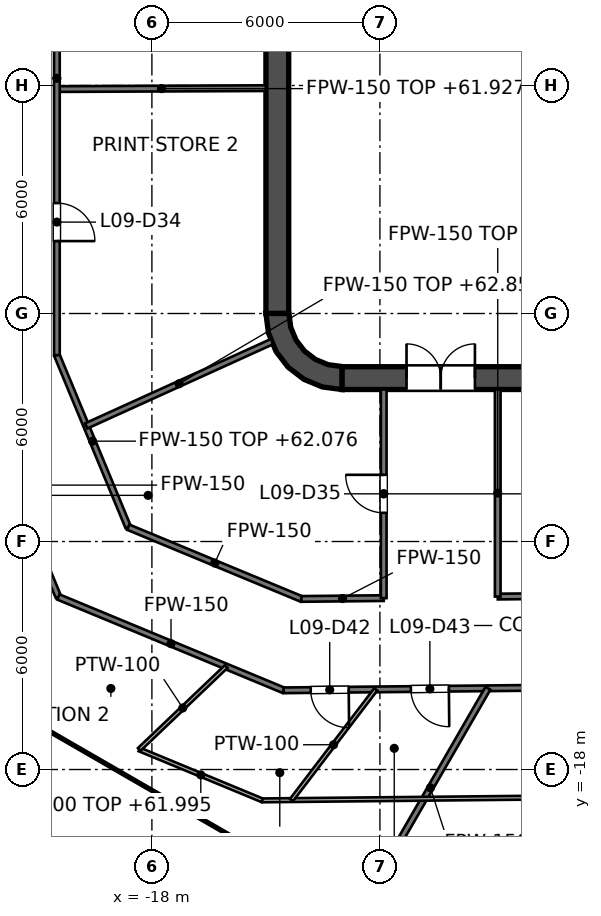
"""IFC4 building model, lengths in metres.
Left out: names, types, materials, properties, quantities, classifications, styles, units other than length and angle.
Written with IfcOpenShell. Run it as: python <this file> out.ifc"""

import sys

from ifc_helpers import new_model, si_unit, direction, frame, frame_2d, origin, place, context, subcontext, project, spatial, polyline, rectangle, outline, extrude, element, fill, save


model = new_model("IFC4")
c1 = context("Model", 3, precision=1e-05, world=origin(), true_north=direction((0.0, 1.0)))
c2 = subcontext(c1, "Body", "Model", "MODEL_VIEW")
j1 = project(units=[si_unit("LENGTHUNIT", "METRE"), si_unit("PLANEANGLEUNIT", "RADIAN")], contexts=[c1])
p1 = place(None, origin())
s1 = spatial("IfcSite", under=j1, at=p1, CompositionType="ELEMENT")
p2 = place(p1, origin())
s2 = spatial("IfcBuilding", under=s1, at=p2, CompositionType="ELEMENT")
p3 = place(p2, frame((0.0, 0.0, 58.8)))
s3 = spatial("IfcBuildingStorey", under=s2, at=p3, CompositionType="ELEMENT", Elevation=58.8)
p4 = place(p3, frame((-13.0, -7.7, 0.0), z_axis=(0.0, 0.0, 1.0), x_axis=(1.0, 0.0, 0.0)))
e1 = element("IfcWall", 1, at=p4, inside=s3, PredefinedType="SHEAR", context=c2, shape_type="SweptSolid", body=[
    extrude(rectangle(XDim=26.0, YDim=0.6, at=frame_2d((13.0, 0.0))), origin(), (0.0, 0.0, 1.0), 4.2),
])
p5 = place(p4, frame((1.7, 0.0, 0.0)))
e2 = element("IfcOpeningElement", 2, at=p5, cuts=e1, PredefinedType="OPENING", context=c2, shape_type="SweptSolid", body=[
    extrude(rectangle(XDim=1.8, YDim=2.1, at=frame_2d((0.9, 1.05))), frame((0.0, 0.3, 0.0), z_axis=(0.0, -1.0, 0.0), x_axis=(1.0, 0.0, 0.0)), (0.0, 0.0, 1.0), 0.6),
])
p6 = place(p4, frame((22.5, 0.0, 0.0)))
e3 = element("IfcOpeningElement", 3, at=p6, cuts=e1, PredefinedType="OPENING", context=c2, shape_type="SweptSolid", body=[
    extrude(rectangle(XDim=1.8, YDim=2.1, at=frame_2d((0.9, 1.05))), frame((0.0, 0.3, 0.0), z_axis=(0.0, -1.0, 0.0), x_axis=(1.0, 0.0, 0.0)), (0.0, 0.0, 1.0), 0.6),
])
p7 = place(p3, frame((-14.7, -6.0, 0.0), z_axis=(0.0, 0.0, 1.0), x_axis=(0.0, 1.0, 0.0)))
e4 = element("IfcWall", 4, at=p7, inside=s3, PredefinedType="SHEAR", context=c2, shape_type="SweptSolid", body=[
    extrude(rectangle(XDim=12.0, YDim=0.6, at=frame_2d((6.0, 0.0))), origin(), (0.0, 0.0, 1.0), 4.2),
])
p8 = place(p3, origin())
e5 = element("IfcWall", 5, at=p8, inside=s3, PredefinedType="SHEAR", context=c2, shape_type="SweptSolid", body=[
    extrude(outline(polyline([(-13.0, -8.0), (-13.0, -7.395), (-13.361, -7.347), (-13.698, -7.208), (-13.986, -6.986), (-14.208, -6.698), (-14.347, -6.361), (-14.395, -6.0), (-15.0, -6.0), (-14.932, -6.518), (-14.732, -7.0), (-14.414, -7.414), (-14.0, -7.732), (-13.518, -7.932), (-13.0, -8.0)])), origin(), (0.0, 0.0, 1.0), 4.2),
])
p9 = place(p3, frame((-9.0, -6.6, 0.0), z_axis=(0.0, 0.0, 1.0), x_axis=(0.0, 1.0, 0.0)))
e6 = element("IfcWall", 6, at=p9, inside=s3, PredefinedType="PARTITIONING", context=c2, shape_type="SweptSolid", body=[
    extrude(rectangle(XDim=2.5, YDim=0.25, at=frame_2d((1.25, 0.0))), origin(), (0.0, 0.0, 1.0), 4.05),
])
p10 = place(p9, frame((0.75, 0.0, 0.0)))
e7 = element("IfcOpeningElement", 7, at=p10, cuts=e6, PredefinedType="OPENING", context=c2, shape_type="SweptSolid", body=[
    extrude(rectangle(XDim=1.0, YDim=2.1, at=frame_2d((0.5, 1.05))), frame((0.0, 0.125, 0.0), z_axis=(0.0, -1.0, 0.0), x_axis=(1.0, 0.0, 0.0)), (0.0, 0.0, 1.0), 0.25),
])
p11 = place(p3, frame((-9.125, -7.0, 0.0), z_axis=(0.0, 0.0, 1.0), x_axis=(1.0, 0.0, 0.0)))
e8 = element("IfcWall", 8, at=p11, inside=s3, PredefinedType="SOLIDWALL", context=c2, shape_type="SweptSolid", body=[
    extrude(rectangle(XDim=18.25, YDim=0.8, at=frame_2d((9.125, 0.0))), origin(), (0.0, 0.0, 1.0), 4.05),
])
p12 = place(p3, frame((-9.125, -1.525, 0.0), z_axis=(0.0, 0.0, 1.0), x_axis=(1.0, 0.0, 0.0)))
e9 = element("IfcWall", 9, at=p12, inside=s3, PredefinedType="SOLIDWALL", context=c2, shape_type="SweptSolid", body=[
    extrude(rectangle(XDim=18.25, YDim=0.25, at=frame_2d((9.125, 0.0))), origin(), (0.0, 0.0, 1.0), 4.05),
])
p13 = place(p12, frame((7.15, 0.0, 0.0)))
e10 = element("IfcOpeningElement", 10, at=p13, cuts=e9, PredefinedType="OPENING", context=c2, shape_type="SweptSolid", body=[
    extrude(rectangle(XDim=1.2, YDim=2.1, at=frame_2d((0.6, 1.05))), frame((0.0, 0.125, 0.0), z_axis=(0.0, -1.0, 0.0), x_axis=(1.0, 0.0, 0.0)), (0.0, 0.0, 1.0), 0.25),
])
p14 = place(p12, frame((10.2, 0.0, 0.0)))
e11 = element("IfcOpeningElement", 11, at=p14, cuts=e9, PredefinedType="OPENING", context=c2, shape_type="SweptSolid", body=[
    extrude(rectangle(XDim=1.2, YDim=2.1, at=frame_2d((0.6, 1.05))), frame((0.0, 0.125, 0.0), z_axis=(0.0, -1.0, 0.0), x_axis=(1.0, 0.0, 0.0)), (0.0, 0.0, 1.0), 0.25),
])
p15 = place(p12, frame((16.075, 0.0, 0.0)))
e12 = element("IfcOpeningElement", 12, at=p15, cuts=e9, PredefinedType="OPENING", context=c2, shape_type="SweptSolid", body=[
    extrude(rectangle(XDim=1.0, YDim=2.1, at=frame_2d((0.5, 1.05))), frame((0.0, 0.125, 0.0), z_axis=(0.0, -1.0, 0.0), x_axis=(1.0, 0.0, 0.0)), (0.0, 0.0, 1.0), 0.25),
])
p16 = place(p3, frame((-9.125, -3.975, 0.0), z_axis=(0.0, 0.0, 1.0), x_axis=(1.0, 0.0, 0.0)))
e13 = element("IfcWall", 13, at=p16, inside=s3, PredefinedType="SOLIDWALL", context=c2, shape_type="SweptSolid", body=[
    extrude(rectangle(XDim=12.4, YDim=0.25, at=frame_2d((6.2, 0.0))), origin(), (0.0, 0.0, 1.0), 4.05),
])
p17 = place(p16, frame((1.05, 0.0, 0.0)))
e14 = element("IfcOpeningElement", 14, at=p17, cuts=e13, PredefinedType="OPENING", context=c2, shape_type="SweptSolid", body=[
    extrude(rectangle(XDim=1.2, YDim=2.1, at=frame_2d((0.6, 1.05))), frame((0.0, 0.125, 0.0), z_axis=(0.0, -1.0, 0.0), x_axis=(1.0, 0.0, 0.0)), (0.0, 0.0, 1.0), 0.25),
])
p18 = place(p16, frame((4.1, 0.0, 0.0)))
e15 = element("IfcOpeningElement", 15, at=p18, cuts=e13, PredefinedType="OPENING", context=c2, shape_type="SweptSolid", body=[
    extrude(rectangle(XDim=1.2, YDim=2.1, at=frame_2d((0.6, 1.05))), frame((0.0, 0.125, 0.0), z_axis=(0.0, -1.0, 0.0), x_axis=(1.0, 0.0, 0.0)), (0.0, 0.0, 1.0), 0.25),
])
p19 = place(p3, frame((-9.0, -3.85, 0.0), z_axis=(0.0, 0.0, 1.0), x_axis=(0.0, 1.0, 0.0)))
e16 = element("IfcWall", 16, at=p19, inside=s3, PredefinedType="SOLIDWALL", context=c2, shape_type="SweptSolid", body=[
    extrude(rectangle(XDim=2.2, YDim=0.25, at=frame_2d((1.1, 0.0))), origin(), (0.0, 0.0, 1.0), 4.05),
])
p20 = place(p3, frame((-11.8, -7.4, 0.0), z_axis=(0.0, 0.0, 1.0), x_axis=(0.0, 1.0, 0.0)))
e17 = element("IfcWall", 17, at=p20, inside=s3, PredefinedType="SOLIDWALL", context=c2, shape_type="SweptSolid", body=[
    extrude(rectangle(XDim=14.8, YDim=0.4, at=frame_2d((7.4, 0.0))), origin(), (0.0, 0.0, 1.0), 4.05),
])
p21 = place(p20, frame((11.2, 0.0, 0.0)))
e18 = element("IfcOpeningElement", 18, at=p21, cuts=e17, PredefinedType="OPENING", context=c2, shape_type="SweptSolid", body=[
    extrude(rectangle(XDim=1.1, YDim=2.1, at=frame_2d((0.55, 1.05))), frame((0.0, 0.2, 0.0), z_axis=(0.0, -1.0, 0.0), x_axis=(1.0, 0.0, 0.0)), (0.0, 0.0, 1.0), 0.4),
])
p22 = place(p20, frame((8.3, 0.0, 0.0)))
e19 = element("IfcOpeningElement", 19, at=p22, cuts=e17, PredefinedType="OPENING", context=c2, shape_type="SweptSolid", body=[
    extrude(rectangle(XDim=1.1, YDim=2.1, at=frame_2d((0.55, 1.05))), frame((0.0, 0.2, 0.0), z_axis=(0.0, -1.0, 0.0), x_axis=(1.0, 0.0, 0.0)), (0.0, 0.0, 1.0), 0.4),
])
p23 = place(p20, frame((5.4, 0.0, 0.0)))
e20 = element("IfcOpeningElement", 20, at=p23, cuts=e17, PredefinedType="OPENING", context=c2, shape_type="SweptSolid", body=[
    extrude(rectangle(XDim=1.1, YDim=2.1, at=frame_2d((0.55, 1.05))), frame((0.0, 0.2, 0.0), z_axis=(0.0, -1.0, 0.0), x_axis=(1.0, 0.0, 0.0)), (0.0, 0.0, 1.0), 0.4),
])
p24 = place(p20, frame((13.552, 0.0, 0.0)))
e21 = element("IfcOpeningElement", 21, at=p24, cuts=e17, PredefinedType="OPENING", context=c2, shape_type="SweptSolid", body=[
    extrude(rectangle(XDim=0.9, YDim=2.1, at=frame_2d((0.45, 1.05))), frame((0.0, 0.2, 0.0), z_axis=(0.0, -1.0, 0.0), x_axis=(1.0, 0.0, 0.0)), (0.0, 0.0, 1.0), 0.4),
])
p25 = place(p20, frame((0.347, 0.0, 0.0)))
e22 = element("IfcOpeningElement", 22, at=p25, cuts=e17, PredefinedType="OPENING", context=c2, shape_type="SweptSolid", body=[
    extrude(rectangle(XDim=0.9, YDim=2.1, at=frame_2d((0.45, 1.05))), frame((0.0, 0.2, 0.0), z_axis=(0.0, -1.0, 0.0), x_axis=(1.0, 0.0, 0.0)), (0.0, 0.0, 1.0), 0.4),
])
e23 = element("IfcWall", 23, at=p8, inside=s3, PredefinedType="SOLIDWALL", context=c2, shape_type="SweptSolid", body=[
    extrude(outline(polyline([(-12.0, -5.925), (-12.0, -5.675), (-14.15, -5.675), (-14.15, -3.025), (-12.0, -3.025), (-12.0, -2.775), (-14.15, -2.775), (-14.15, -0.125), (-12.0, -0.125), (-12.0, 0.125), (-14.15, 0.125), (-14.15, 2.775), (-12.0, 2.775), (-12.0, 3.025), (-14.15, 3.025), (-14.15, 5.675), (-12.0, 5.675), (-12.0, 5.925), (-14.15, 5.925), (-14.4, 5.925), (-14.4, 5.675), (-14.4, 3.025), (-14.4, 2.775), (-14.4, 0.125), (-14.4, -0.125), (-14.4, -2.775), (-14.4, -3.025), (-14.4, -5.675), (-14.4, -5.925), (-14.15, -5.925), (-12.0, -5.925)])), origin(), (0.0, 0.0, 1.0), 4.05),
])
p26 = place(p3, frame((-22.9, -7.572, 0.0), z_axis=(0.0, 0.0, 1.0), x_axis=(0.382860357704, -0.923806227788, 0.0)))
e24 = element("IfcWall", 24, at=p26, inside=s3, PredefinedType="PARTITIONING", context=c2, shape_type="SweptSolid", body=[
    extrude(rectangle(XDim=6.374, YDim=0.15, at=frame_2d((3.187, 0.0))), origin(), (0.0, 0.0, 1.0), 3.195),
])
p27 = place(p3, frame((-20.5, -7.095, 0.0), z_axis=(0.0, 0.0, 1.0), x_axis=(0.382878184095, -0.923798839653, 0.0)))
e25 = element("IfcWall", 25, at=p27, inside=s3, PredefinedType="PARTITIONING", context=c2, shape_type="SweptSolid", body=[
    extrude(rectangle(XDim=4.902, YDim=0.15, at=frame_2d((2.451, 0.0))), origin(), (0.0, 0.0, 1.0), 3.276),
])
p28 = place(p3, frame((-20.46, -13.46, 0.0), z_axis=(0.0, 0.0, 1.0), x_axis=(0.9237825057, -0.382917591869, 0.0)))
e26 = element("IfcWall", 26, at=p28, inside=s3, PredefinedType="PARTITIONING", context=c2, shape_type="SweptSolid", body=[
    extrude(rectangle(XDim=6.415, YDim=0.15, at=frame_2d((3.208, 0.0))), origin(), (0.0, 0.0, 1.0), 3.195),
])
p29 = place(p3, frame((-18.623, -11.623, 0.0), z_axis=(0.0, 0.0, 1.0), x_axis=(0.923791670587, -0.38289548098, 0.0)))
e27 = element("IfcWall", 27, at=p29, inside=s3, PredefinedType="PARTITIONING", context=c2, shape_type="SweptSolid", body=[
    extrude(rectangle(XDim=4.931, YDim=0.15, at=frame_2d((2.465, 0.0))), origin(), (0.0, 0.0, 1.0), 3.195),
])
p30 = place(p3, frame((-20.5, -0.094, 0.0), z_axis=(0.0, 0.0, 1.0), x_axis=(0.999990148138, 0.004438876723, 0.0)))
e28 = element("IfcWall", 28, at=p30, inside=s3, PredefinedType="PARTITIONING", context=c2, shape_type="SweptSolid", body=[
    extrude(rectangle(XDim=5.5, YDim=0.15, at=frame_2d((2.75, 0.0))), origin(), (0.0, 0.0, 1.0), 3.127),
])
p31 = place(p3, frame((-14.534, -15.916, 0.0), z_axis=(0.0, 0.0, 1.0), x_axis=(0.999950637767, 0.009935896005, 0.0)))
e29 = element("IfcWall", 29, at=p31, inside=s3, PredefinedType="PARTITIONING", context=c2, shape_type="SweptSolid", body=[
    extrude(rectangle(XDim=33.123, YDim=0.15, at=frame_2d((16.561, 0.0))), origin(), (0.0, 0.0, 1.0), 3.127),
])
p32 = place(p31, frame((0.713, 0.0, 0.0)))
e30 = element("IfcOpeningElement", 30, at=p32, cuts=e29, PredefinedType="OPENING", context=c2, shape_type="SweptSolid", body=[
    extrude(rectangle(XDim=1.0, YDim=2.1, at=frame_2d((0.5, 1.05))), frame((0.0, 0.075, 0.0), z_axis=(0.0, -1.0, 0.0), x_axis=(1.0, 0.0, 0.0)), (0.0, 0.0, 1.0), 0.15),
])
p33 = place(p31, frame((3.349, 0.0, 0.0)))
e31 = element("IfcOpeningElement", 31, at=p33, cuts=e29, PredefinedType="OPENING", context=c2, shape_type="SweptSolid", body=[
    extrude(rectangle(XDim=1.0, YDim=2.1, at=frame_2d((0.5, 1.05))), frame((0.0, 0.075, 0.0), z_axis=(0.0, -1.0, 0.0), x_axis=(1.0, 0.0, 0.0)), (0.0, 0.0, 1.0), 0.15),
])
p34 = place(p31, frame((16.111, 0.0, 0.0)))
e32 = element("IfcOpeningElement", 32, at=p34, cuts=e29, PredefinedType="OPENING", context=c2, shape_type="SweptSolid", body=[
    extrude(rectangle(XDim=1.0, YDim=2.1, at=frame_2d((0.5, 1.05))), frame((0.0, 0.075, 0.0), z_axis=(0.0, -1.0, 0.0), x_axis=(1.0, 0.0, 0.0)), (0.0, 0.0, 1.0), 0.15),
])
p35 = place(p31, frame((25.386, 0.0, 0.0)))
e33 = element("IfcOpeningElement", 33, at=p35, cuts=e29, PredefinedType="OPENING", context=c2, shape_type="SweptSolid", body=[
    extrude(rectangle(XDim=1.0, YDim=2.1, at=frame_2d((0.5, 1.05))), frame((0.0, 0.075, 0.0), z_axis=(0.0, -1.0, 0.0), x_axis=(1.0, 0.0, 0.0)), (0.0, 0.0, 1.0), 0.15),
])
p36 = place(p3, frame((-14.068, -13.511, 0.0), z_axis=(0.0, 0.0, 1.0), x_axis=(0.999950911515, 0.009908307647, 0.0)))
e34 = element("IfcWall", 34, at=p36, inside=s3, PredefinedType="PARTITIONING", context=c2, shape_type="SweptSolid", body=[
    extrude(rectangle(XDim=2.168, YDim=0.15, at=frame_2d((1.084, 0.0))), origin(), (0.0, 0.0, 1.0), 3.195),
])
p37 = place(p3, frame((-8.9, -13.449, 0.0), z_axis=(0.0, 0.0, 1.0), x_axis=(0.999950697987, 0.009929833562, 0.0)))
e35 = element("IfcWall", 35, at=p37, inside=s3, PredefinedType="PARTITIONING", context=c2, shape_type="SweptSolid", body=[
    extrude(rectangle(XDim=17.801, YDim=0.15, at=frame_2d((8.9, 0.0))), origin(), (0.0, 0.0, 1.0), 3.127),
])
p38 = place(p37, frame((3.818, 0.0, 0.0)))
e36 = element("IfcOpeningElement", 36, at=p38, cuts=e35, PredefinedType="OPENING", context=c2, shape_type="SweptSolid", body=[
    extrude(rectangle(XDim=1.0, YDim=2.1, at=frame_2d((0.5, 1.05))), frame((0.0, 0.075, 0.0), z_axis=(0.0, -1.0, 0.0), x_axis=(1.0, 0.0, 0.0)), (0.0, 0.0, 1.0), 0.15),
])
p39 = place(p37, frame((8.391, 0.0, 0.0)))
e37 = element("IfcOpeningElement", 37, at=p39, cuts=e35, PredefinedType="OPENING", context=c2, shape_type="SweptSolid", body=[
    extrude(rectangle(XDim=1.0, YDim=2.1, at=frame_2d((0.5, 1.05))), frame((0.0, 0.075, 0.0), z_axis=(0.0, -1.0, 0.0), x_axis=(1.0, 0.0, 0.0)), (0.0, 0.0, 1.0), 0.15),
])
p40 = place(p37, frame((12.975, 0.0, 0.0)))
e38 = element("IfcOpeningElement", 38, at=p40, cuts=e35, PredefinedType="OPENING", context=c2, shape_type="SweptSolid", body=[
    extrude(rectangle(XDim=1.0, YDim=2.1, at=frame_2d((0.5, 1.05))), frame((0.0, 0.075, 0.0), z_axis=(0.0, -1.0, 0.0), x_axis=(1.0, 0.0, 0.0)), (0.0, 0.0, 1.0), 0.15),
])
p41 = place(p3, frame((-19.728, -8.958, 0.0), z_axis=(0.0, 0.0, 1.0), x_axis=(0.910629511797, 0.413223779863, 0.0)))
e39 = element("IfcWall", 39, at=p41, inside=s3, PredefinedType="PARTITIONING", context=c2, shape_type="SweptSolid", body=[
    extrude(rectangle(XDim=5.368, YDim=0.15, at=frame_2d((2.684, 0.0))), origin(), (0.0, 0.0, 1.0), 4.05),
])
p42 = place(p3, frame((-12.184, -21.103, 0.0), z_axis=(0.0, 0.0, 1.0), x_axis=(0.500022810783, 0.866012233572, 0.0)))
e40 = element("IfcWall", 40, at=p42, inside=s3, PredefinedType="PARTITIONING", context=c2, shape_type="SweptSolid", body=[
    extrude(rectangle(XDim=6.051, YDim=0.15, at=frame_2d((3.025, 0.0))), origin(), (0.0, 0.0, 1.0), 3.502),
])
p43 = place(p3, frame((-8.9, -13.449, 0.0), z_axis=(0.0, 0.0, 1.0), x_axis=(0.0, 1.0, 0.0)))
e41 = element("IfcWall", 41, at=p43, inside=s3, PredefinedType="PARTITIONING", context=c2, shape_type="SweptSolid", body=[
    extrude(rectangle(XDim=5.449, YDim=0.15, at=frame_2d((2.725, 0.0))), origin(), (0.0, 0.0, 1.0), 3.127),
])
p44 = place(p3, frame((-11.9, -13.49, 0.0), z_axis=(0.0, 0.0, 1.0), x_axis=(0.0, 1.0, 0.0)))
e42 = element("IfcWall", 42, at=p44, inside=s3, PredefinedType="PARTITIONING", context=c2, shape_type="SweptSolid", body=[
    extrude(rectangle(XDim=5.49, YDim=0.15, at=frame_2d((2.745, 0.0))), origin(), (0.0, 0.0, 1.0), 3.195),
])
p45 = place(p44, frame((2.245, 0.0, 0.0)))
e43 = element("IfcOpeningElement", 43, at=p45, cuts=e42, PredefinedType="OPENING", context=c2, shape_type="SweptSolid", body=[
    extrude(rectangle(XDim=1.0, YDim=2.1, at=frame_2d((0.5, 1.05))), frame((0.0, 0.075, 0.0), z_axis=(0.0, -1.0, 0.0), x_axis=(1.0, 0.0, 0.0)), (0.0, 0.0, 1.0), 0.15),
])
p46 = place(p3, frame((-20.5, -7.095, 0.0), z_axis=(0.0, 0.0, 1.0), x_axis=(0.0, 1.0, 0.0)))
e44 = element("IfcWall", 44, at=p46, inside=s3, PredefinedType="PARTITIONING", context=c2, shape_type="SweptSolid", body=[
    extrude(rectangle(XDim=14.569, YDim=0.15, at=frame_2d((7.285, 0.0))), origin(), (0.0, 0.0, 1.0), 3.127),
])
p47 = place(p46, frame((10.234, 0.0, 0.0)))
e45 = element("IfcOpeningElement", 45, at=p47, cuts=e44, PredefinedType="OPENING", context=c2, shape_type="SweptSolid", body=[
    extrude(rectangle(XDim=1.0, YDim=2.1, at=frame_2d((0.5, 1.05))), frame((0.0, 0.075, 0.0), z_axis=(0.0, -1.0, 0.0), x_axis=(1.0, 0.0, 0.0)), (0.0, 0.0, 1.0), 0.15),
])
p48 = place(p46, frame((3.0, 0.0, 0.0)))
e46 = element("IfcOpeningElement", 46, at=p48, cuts=e44, PredefinedType="OPENING", context=c2, shape_type="SweptSolid", body=[
    extrude(rectangle(XDim=1.0, YDim=2.1, at=frame_2d((0.5, 1.05))), frame((0.0, 0.075, 0.0), z_axis=(0.0, -1.0, 0.0), x_axis=(1.0, 0.0, 0.0)), (0.0, 0.0, 1.0), 0.15),
])
p49 = place(p3, frame((-18.332, -17.471, 0.0), z_axis=(0.0, 0.0, 1.0), x_axis=(0.923856315575, -0.3827394782, 0.0)))
e47 = element("IfcWall", 47, at=p49, inside=s3, PredefinedType="PARTITIONING", context=c2, shape_type="SweptSolid", body=[
    extrude(rectangle(XDim=3.504, YDim=0.1, at=frame_2d((1.752, 0.0))), origin(), (0.0, 0.0, 1.0), 3.195),
])
p50 = place(p3, frame((-15.095, -18.812, 0.0), z_axis=(0.0, 0.0, 1.0), x_axis=(0.999950080065, 0.009991865576, 0.0)))
e48 = element("IfcWall", 48, at=p50, inside=s3, PredefinedType="PARTITIONING", context=c2, shape_type="SweptSolid", body=[
    extrude(rectangle(XDim=33.255, YDim=0.1, at=frame_2d((16.627, 0.0))), origin(), (0.0, 0.0, 1.0), 3.127),
])
p51 = place(p50, frame((11.671, 0.0, 0.0)))
e49 = element("IfcOpeningElement", 49, at=p51, cuts=e48, PredefinedType="OPENING", context=c2, shape_type="SweptSolid", body=[
    extrude(rectangle(XDim=0.9, YDim=2.1, at=frame_2d((0.45, 1.05))), frame((0.0, 0.05, 0.0), z_axis=(0.0, -1.0, 0.0), x_axis=(1.0, 0.0, 0.0)), (0.0, 0.0, 1.0), 0.1),
])
p52 = place(p50, frame((25.918, 0.0, 0.0)))
e50 = element("IfcOpeningElement", 50, at=p52, cuts=e48, PredefinedType="OPENING", context=c2, shape_type="SweptSolid", body=[
    extrude(rectangle(XDim=0.9, YDim=2.1, at=frame_2d((0.45, 1.05))), frame((0.0, 0.05, 0.0), z_axis=(0.0, -1.0, 0.0), x_axis=(1.0, 0.0, 0.0)), (0.0, 0.0, 1.0), 0.1),
])
p53 = place(p3, frame((-18.332, -17.471, 0.0), z_axis=(0.0, 0.0, 1.0), x_axis=(0.723856845345, 0.689950192005, 0.0)))
e51 = element("IfcWall", 51, at=p53, inside=s3, PredefinedType="PARTITIONING", context=c2, shape_type="SweptSolid", body=[
    extrude(rectangle(XDim=3.161, YDim=0.1, at=frame_2d((1.581, 0.0))), origin(), (0.0, 0.0, 1.0), 4.05),
])
p54 = place(p3, frame((-14.328, -18.804, 0.0), z_axis=(0.0, 0.0, 1.0), x_axis=(0.606117553719, 0.795375075718, 0.0)))
e52 = element("IfcWall", 52, at=p54, inside=s3, PredefinedType="PARTITIONING", context=c2, shape_type="SweptSolid", body=[
    extrude(rectangle(XDim=3.661, YDim=0.1, at=frame_2d((1.831, 0.0))), origin(), (0.0, 0.0, 1.0), 4.05),
])
p55 = place(p23, origin())
e53 = element("IfcDoor", 53, at=p55, inside=s3, OperationType="DOUBLE_DOOR_SLIDING", PredefinedType="DOOR", context=c2, shape_type="SweptSolid", body=[
    extrude(rectangle(XDim=1.1, YDim=2.1, at=frame_2d((0.55, 1.05))), frame((0.0, 0.025, 0.0), z_axis=(0.0, -1.0, 0.0), x_axis=(1.0, 0.0, 0.0)), (0.0, 0.0, 1.0), 0.05),
])
fill(e20, e53)
p56 = place(p10, origin())
e54 = element("IfcDoor", 54, at=p56, inside=s3, OperationType="SINGLE_SWING_LEFT", PredefinedType="DOOR", context=c2, shape_type="SweptSolid", body=[
    extrude(rectangle(XDim=1.0, YDim=2.1, at=frame_2d((0.5, 1.05))), frame((0.0, 0.025, 0.0), z_axis=(0.0, -1.0, 0.0), x_axis=(1.0, 0.0, 0.0)), (0.0, 0.0, 1.0), 0.05),
])
fill(e7, e54)
p57 = place(p25, origin())
e55 = element("IfcDoor", 55, at=p57, inside=s3, OperationType="SINGLE_SWING_LEFT", PredefinedType="DOOR", context=c2, shape_type="SweptSolid", body=[
    extrude(rectangle(XDim=0.9, YDim=2.1, at=frame_2d((0.45, 1.05))), frame((0.0, 0.025, 0.0), z_axis=(0.0, -1.0, 0.0), x_axis=(1.0, 0.0, 0.0)), (0.0, 0.0, 1.0), 0.05),
])
fill(e22, e55)
p58 = place(p5, origin())
e56 = element("IfcDoor", 56, at=p58, inside=s3, OperationType="DOUBLE_DOOR_SINGLE_SWING", PredefinedType="DOOR", context=c2, shape_type="SweptSolid", body=[
    extrude(rectangle(XDim=1.8, YDim=2.1, at=frame_2d((0.9, 1.05))), frame((0.0, 0.025, 0.0), z_axis=(0.0, -1.0, 0.0), x_axis=(1.0, 0.0, 0.0)), (0.0, 0.0, 1.0), 0.05),
])
fill(e2, e56)
p59 = place(p48, origin())
e57 = element("IfcDoor", 57, at=p59, inside=s3, OperationType="SINGLE_SWING_LEFT", PredefinedType="DOOR", context=c2, shape_type="SweptSolid", body=[
    extrude(rectangle(XDim=1.0, YDim=2.1, at=frame_2d((0.5, 1.05))), frame((0.0, 0.025, 0.0), z_axis=(0.0, -1.0, 0.0), x_axis=(1.0, 0.0, 0.0)), (0.0, 0.0, 1.0), 0.05),
])
fill(e46, e57)
p60 = place(p45, origin())
e58 = element("IfcDoor", 58, at=p60, inside=s3, OperationType="SINGLE_SWING_RIGHT", PredefinedType="DOOR", context=c2, shape_type="SweptSolid", body=[
    extrude(rectangle(XDim=1.0, YDim=2.1, at=frame_2d((0.5, 1.05))), frame((0.0, 0.025, 0.0), z_axis=(0.0, -1.0, 0.0), x_axis=(1.0, 0.0, 0.0)), (0.0, 0.0, 1.0), 0.05),
])
fill(e43, e58)
p61 = place(p32, origin())
e59 = element("IfcDoor", 59, at=p61, inside=s3, OperationType="SINGLE_SWING_RIGHT", PredefinedType="DOOR", context=c2, shape_type="SweptSolid", body=[
    extrude(rectangle(XDim=1.0, YDim=2.1, at=frame_2d((0.5, 1.05))), frame((0.0, 0.025, 0.0), z_axis=(0.0, -1.0, 0.0), x_axis=(1.0, 0.0, 0.0)), (0.0, 0.0, 1.0), 0.05),
])
fill(e30, e59)
p62 = place(p33, origin())
e60 = element("IfcDoor", 60, at=p62, inside=s3, OperationType="SINGLE_SWING_RIGHT", PredefinedType="DOOR", context=c2, shape_type="SweptSolid", body=[
    extrude(rectangle(XDim=1.0, YDim=2.1, at=frame_2d((0.5, 1.05))), frame((0.0, 0.025, 0.0), z_axis=(0.0, -1.0, 0.0), x_axis=(1.0, 0.0, 0.0)), (0.0, 0.0, 1.0), 0.05),
])
fill(e31, e60)
save(model, sys.argv[1])
